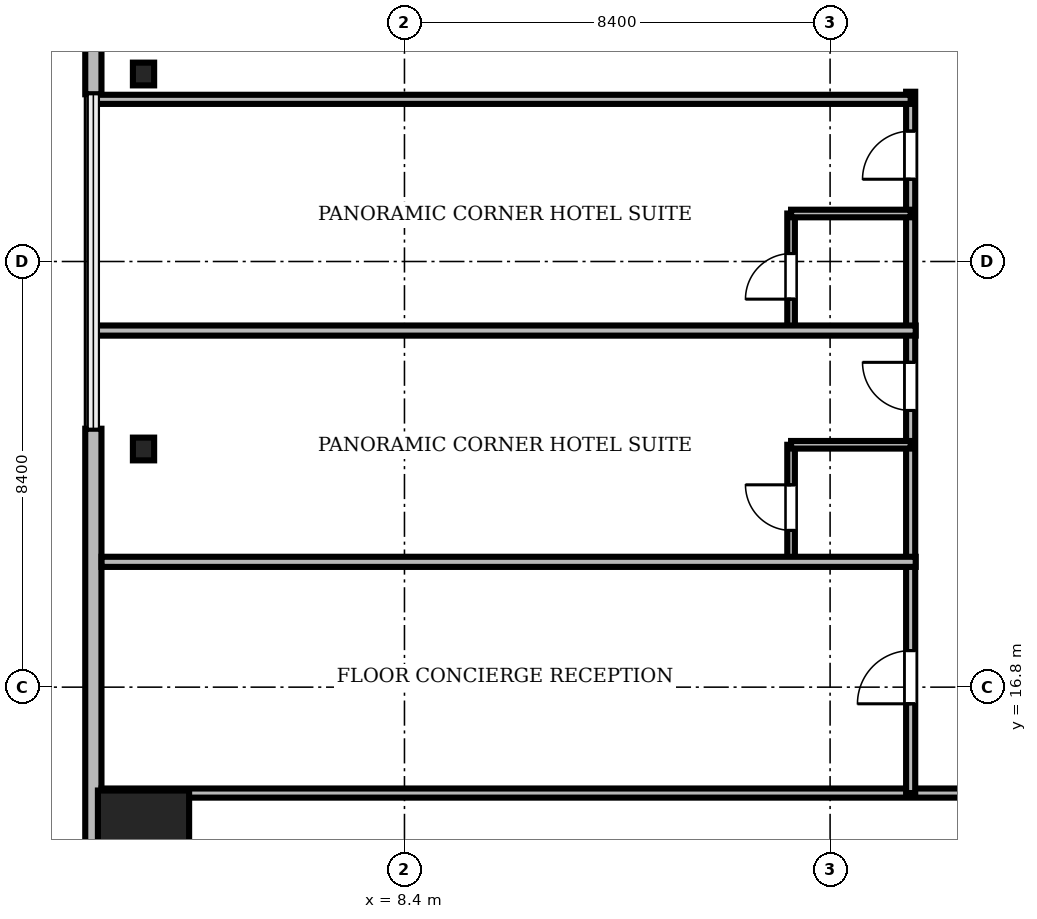
"""IFC4 building model, lengths in metres.
Left out: names, types, materials, properties, quantities, classifications, styles, units other than length and angle.
Written with IfcOpenShell. Run it as: python <this file> out.ifc"""

import sys

from ifc_helpers import new_model, si_unit, direction, frame, frame_2d, origin, origin_2d, place, context, subcontext, project, spatial, rectangle, i_section, extrude, source, transform, mapped, element, fill, save


model = new_model("IFC4")
c1 = context("Model", 3, precision=1e-05, world=origin(), true_north=direction((0.0, 1.0)))
c2 = subcontext(c1, "Body", "Model", "MODEL_VIEW")
j1 = project(units=[si_unit("LENGTHUNIT", "METRE"), si_unit("PLANEANGLEUNIT", "RADIAN")], contexts=[c1])
p1 = place(None, origin())
s1 = spatial("IfcSite", under=j1, at=p1, CompositionType="ELEMENT")
p2 = place(p1, origin())
s2 = spatial("IfcBuilding", under=s1, at=p2, CompositionType="ELEMENT")
p3 = place(p2, frame((0.0, 0.0, 42.2)))
s3 = spatial("IfcBuildingStorey", under=s2, at=p3, CompositionType="ELEMENT", Elevation=42.2)
m1 = source(origin(), c2, "Body", "SweptSolid", [
    extrude(rectangle(XDim=1.8, YDim=1.8, at=origin_2d()), origin(), (0.0, 0.0, 1.0), 3.41),
])
p4 = place(p3, frame((3.25, 13.86, 0.0), z_axis=(0.0, 0.0, 1.0), x_axis=(1.0, 0.0, 0.0)))
e1 = element("IfcColumn", 1, at=p4, inside=s3, PredefinedType="COLUMN", context=c2, shape_type="MappedRepresentation", body=[
    mapped(m1, transform((0.0, 0.0, 0.0), scale=1.0)),
])
m2 = source(origin(), c2, "Body", "SweptSolid", [
    extrude(i_section(OverallWidth=0.419, OverallDepth=0.449, WebThickness=0.031, FlangeThickness=0.048, FilletRadius=0.015, at=origin_2d()), origin(), (0.0, 0.0, 1.0), 3.41),
])
for number, where, z_axis, x_axis in (
    (2, (3.25, 28.9, 0.0), (0.0, 0.0, 1.0), (1.0, 0.0, 0.0)),
    (3, (3.25, 21.5, 0.0), (0.0, 0.0, 1.0), (1.0, 0.0, 0.0)),
):
    element("IfcColumn", number, at=place(p3, frame(where, z_axis=z_axis, x_axis=x_axis)), inside=s3, PredefinedType="COLUMN", context=c2, shape_type="MappedRepresentation", body=[
        mapped(m2, transform((0.0, 0.0, 0.0), scale=1.0)),
    ])
m3 = source(origin(), c2, "Body", "SweptSolid", [
    extrude(rectangle(XDim=15.6, YDim=0.32, at=frame_2d((7.8, 0.0))), origin(), (0.0, 0.0, 1.0), 3.41),
])
p5 = place(p3, frame((2.26, 44.1, 0.0), z_axis=(0.0, 0.0, 1.0), x_axis=(0.0, -1.0, 0.0)))
e4 = element("IfcWall", 4, at=p5, inside=s3, PredefinedType="SOLIDWALL", context=c2, shape_type="MappedRepresentation", body=[
    mapped(m3, transform((0.0, 0.0, 0.0), scale=1.0)),
])
m4 = source(origin(), c2, "Body", "SweptSolid", [
    extrude(rectangle(XDim=1.4, YDim=2.3, at=frame_2d((0.7, 1.15))), frame((0.0, 0.17, 0.0), z_axis=(0.0, -1.0, 0.0), x_axis=(1.0, 0.0, 0.0)), (0.0, 0.0, 1.0), 0.34),
])
p6 = place(p5, frame((9.61, 0.0, 0.0)))
e5 = element("IfcOpeningElement", 5, at=p6, cuts=e4, PredefinedType="OPENING", context=c2, shape_type="MappedRepresentation", body=[
    mapped(m4, transform((0.0, 0.0, 0.0), scale=1.0)),
])
m5 = source(origin(), c2, "Body", "SweptSolid", [
    extrude(rectangle(XDim=2.8, YDim=2.4, at=frame_2d((1.4, 1.2))), frame((0.0, 0.17, 0.0), z_axis=(0.0, -1.0, 0.0), x_axis=(1.0, 0.0, 0.0)), (0.0, 0.0, 1.0), 0.34),
])
p7 = place(p5, frame((2.705, 0.0, 0.72)))
e6 = element("IfcOpeningElement", 6, at=p7, cuts=e4, PredefinedType="OPENING", context=c2, shape_type="MappedRepresentation", body=[
    mapped(m5, transform((0.0, 0.0, 0.0), scale=1.0)),
])
m6 = source(origin(), c2, "Body", "SweptSolid", [
    extrude(rectangle(XDim=15.6, YDim=0.32, at=frame_2d((7.8, 0.0))), origin(), (0.0, 0.0, 1.0), 3.41),
])
p8 = place(p3, frame((2.26, 21.9, 0.0), z_axis=(0.0, 0.0, 1.0), x_axis=(0.0, -1.0, 0.0)))
e7 = element("IfcWall", 7, at=p8, inside=s3, PredefinedType="SOLIDWALL", context=c2, shape_type="MappedRepresentation", body=[
    mapped(m6, transform((0.0, 0.0, 0.0), scale=1.0)),
])
p9 = place(p8, frame((10.095, 0.0, 0.72)))
e8 = element("IfcOpeningElement", 8, at=p9, cuts=e7, PredefinedType="OPENING", context=c2, shape_type="MappedRepresentation", body=[
    mapped(m5, transform((0.0, 0.0, 0.0), scale=1.0)),
])
m7 = source(origin(), c2, "Body", "SweptSolid", [
    extrude(rectangle(XDim=46.156, YDim=0.18, at=frame_2d((23.078, 0.0))), origin(), (0.0, 0.0, 1.0), 2.652),
])
p10 = place(p3, frame((2.422, 14.71, 0.0), z_axis=(0.0, 0.0, 1.0), x_axis=(1.0, 0.0, 0.0)))
e9 = element("IfcWall", 9, at=p10, inside=s3, PredefinedType="PARTITIONING", context=c2, shape_type="MappedRepresentation", body=[
    mapped(m7, transform((0.0, 0.0, 0.0), scale=1.0)),
])
m8 = source(origin(), c2, "Body", "SweptSolid", [
    extrude(rectangle(XDim=1.05, YDim=2.2, at=frame_2d((0.525, 1.1))), frame((0.0, 0.1, 0.0), z_axis=(0.0, -1.0, 0.0), x_axis=(1.0, 0.0, 0.0)), (0.0, 0.0, 1.0), 0.2),
])
p11 = place(p10, frame((16.988, 0.0, 0.0)))
e10 = element("IfcOpeningElement", 10, at=p11, cuts=e9, PredefinedType="OPENING", context=c2, shape_type="MappedRepresentation", body=[
    mapped(m8, transform((0.0, 0.0, 0.0), scale=1.0)),
])
m9 = source(origin(), c2, "Body", "SweptSolid", [
    extrude(rectangle(XDim=0.95, YDim=2.15, at=frame_2d((0.475, 1.075))), frame((0.0, 0.1, 0.0), z_axis=(0.0, -1.0, 0.0), x_axis=(1.0, 0.0, 0.0)), (0.0, 0.0, 1.0), 0.2),
])
p12 = place(p10, frame((21.556, 0.0, 0.0)))
e11 = element("IfcOpeningElement", 11, at=p12, cuts=e9, PredefinedType="OPENING", context=c2, shape_type="MappedRepresentation", body=[
    mapped(m9, transform((0.0, 0.0, 0.0), scale=1.0)),
])
p13 = place(p10, frame((25.358, 0.0, 0.0)))
e12 = element("IfcOpeningElement", 12, at=p13, cuts=e9, PredefinedType="OPENING", context=c2, shape_type="MappedRepresentation", body=[
    mapped(m8, transform((0.0, 0.0, 0.0), scale=1.0)),
])
p14 = place(p10, frame((30.385, 0.0, 0.0)))
e13 = element("IfcOpeningElement", 13, at=p14, cuts=e9, PredefinedType="OPENING", context=c2, shape_type="MappedRepresentation", body=[
    mapped(m8, transform((0.0, 0.0, 0.0), scale=1.0)),
])
p15 = place(p10, frame((35.411, 0.0, 0.0)))
e14 = element("IfcOpeningElement", 14, at=p15, cuts=e9, PredefinedType="OPENING", context=c2, shape_type="MappedRepresentation", body=[
    mapped(m8, transform((0.0, 0.0, 0.0), scale=1.0)),
])
p16 = place(p10, frame((41.766, 0.0, 0.0)))
e15 = element("IfcOpeningElement", 15, at=p16, cuts=e9, PredefinedType="OPENING", context=c2, shape_type="MappedRepresentation", body=[
    mapped(m8, transform((0.0, 0.0, 0.0), scale=1.0)),
])
m10 = source(origin(), c2, "Body", "SweptSolid", [
    extrude(rectangle(XDim=13.84, YDim=0.18, at=frame_2d((6.92, 0.0))), origin(), (0.0, 0.0, 1.0), 2.802),
])
p17 = place(p3, frame((18.39, 14.71, 0.0), z_axis=(0.0, 0.0, 1.0), x_axis=(0.0, 1.0, 0.0)))
e16 = element("IfcWall", 16, at=p17, inside=s3, PredefinedType="PARTITIONING", context=c2, shape_type="MappedRepresentation", body=[
    mapped(m10, transform((0.0, 0.0, 0.0), scale=1.0)),
])
p18 = place(p17, frame((1.762, 0.0, 0.0)))
e17 = element("IfcOpeningElement", 17, at=p18, cuts=e16, PredefinedType="OPENING", context=c2, shape_type="MappedRepresentation", body=[
    mapped(m8, transform((0.0, 0.0, 0.0), scale=1.0)),
])
p19 = place(p17, frame((7.55, 0.0, 0.0)))
e18 = element("IfcOpeningElement", 18, at=p19, cuts=e16, PredefinedType="OPENING", context=c2, shape_type="MappedRepresentation", body=[
    mapped(m9, transform((0.0, 0.0, 0.0), scale=1.0)),
])
p20 = place(p17, frame((12.113, 0.0, 0.0)))
e19 = element("IfcOpeningElement", 19, at=p20, cuts=e16, PredefinedType="OPENING", context=c2, shape_type="MappedRepresentation", body=[
    mapped(m9, transform((0.0, 0.0, 0.0), scale=1.0)),
])
m11 = source(origin(), c2, "Body", "SweptSolid", [
    extrude(rectangle(XDim=2.29, YDim=0.15, at=frame_2d((1.145, 0.0))), origin(), (0.0, 0.0, 1.0), 2.802),
])
p21 = place(p3, frame((16.03, 19.293, 0.0), z_axis=(0.0, 0.0, 1.0), x_axis=(0.0, 1.0, 0.0)))
e20 = element("IfcWall", 20, at=p21, inside=s3, PredefinedType="PARTITIONING", context=c2, shape_type="MappedRepresentation", body=[
    mapped(m11, transform((0.0, 0.0, 0.0), scale=1.0)),
])
m12 = source(origin(), c2, "Body", "SweptSolid", [
    extrude(rectangle(XDim=0.9, YDim=2.1, at=frame_2d((0.45, 1.05))), frame((0.0, 0.085, 0.0), z_axis=(0.0, -1.0, 0.0), x_axis=(1.0, 0.0, 0.0)), (0.0, 0.0, 1.0), 0.17),
])
p22 = place(p21, frame((0.6, 0.0, 0.0)))
e21 = element("IfcOpeningElement", 21, at=p22, cuts=e20, PredefinedType="OPENING", context=c2, shape_type="MappedRepresentation", body=[
    mapped(m12, transform((0.0, 0.0, 0.0), scale=1.0)),
])
m13 = source(origin(), c2, "Body", "SweptSolid", [
    extrude(rectangle(XDim=2.29, YDim=0.15, at=frame_2d((1.145, 0.0))), origin(), (0.0, 0.0, 1.0), 3.41),
])
p23 = place(p3, frame((16.03, 23.857, 0.0), z_axis=(0.0, 0.0, 1.0), x_axis=(0.0, 1.0, 0.0)))
e22 = element("IfcWall", 22, at=p23, inside=s3, PredefinedType="PARTITIONING", context=c2, shape_type="MappedRepresentation", body=[
    mapped(m13, transform((0.0, 0.0, 0.0), scale=1.0)),
])
p24 = place(p23, frame((0.6, 0.0, 0.0)))
e23 = element("IfcOpeningElement", 23, at=p24, cuts=e22, PredefinedType="OPENING", context=c2, shape_type="MappedRepresentation", body=[
    mapped(m12, transform((0.0, 0.0, 0.0), scale=1.0)),
])
m14 = source(origin(), c2, "Body", "SweptSolid", [
    extrude(rectangle(XDim=16.068, YDim=0.2, at=frame_2d((8.034, 0.0))), origin(), (0.0, 0.0, 1.0), 2.652),
])
p25 = place(p3, frame((2.422, 19.273, 0.0), z_axis=(0.0, 0.0, 1.0), x_axis=(1.0, 0.0, 0.0)))
e24 = element("IfcWall", 24, at=p25, inside=s3, PredefinedType="PARTITIONING", context=c2, shape_type="MappedRepresentation", body=[
    mapped(m14, transform((0.0, 0.0, 0.0), scale=1.0)),
])
m15 = source(origin(), c2, "Body", "SweptSolid", [
    extrude(rectangle(XDim=16.26, YDim=0.2, at=frame_2d((8.13, 0.0))), origin(), (0.0, 0.0, 1.0), 2.652),
])
p26 = place(p3, frame((2.23, 23.837, 0.0), z_axis=(0.0, 0.0, 1.0), x_axis=(1.0, 0.0, 0.0)))
e25 = element("IfcWall", 25, at=p26, inside=s3, PredefinedType="PARTITIONING", context=c2, shape_type="MappedRepresentation", body=[
    mapped(m15, transform((0.0, 0.0, 0.0), scale=1.0)),
])
m16 = source(origin(), c2, "Body", "SweptSolid", [
    extrude(rectangle(XDim=16.16, YDim=0.18, at=frame_2d((8.08, 0.0))), origin(), (0.0, 0.0, 1.0), 2.652),
])
p27 = place(p3, frame((2.23, 28.4, 0.0), z_axis=(0.0, 0.0, 1.0), x_axis=(1.0, 0.0, 0.0)))
e26 = element("IfcWall", 26, at=p27, inside=s3, PredefinedType="PARTITIONING", context=c2, shape_type="MappedRepresentation", body=[
    mapped(m16, transform((0.0, 0.0, 0.0), scale=1.0)),
])
m17 = source(origin(), c2, "Body", "SweptSolid", [
    extrude(rectangle(XDim=2.36, YDim=0.15, at=frame_2d((1.18, 0.0))), origin(), (0.0, 0.0, 1.0), 3.41),
])
for number, where, z_axis, x_axis in (
    (27, (16.03, 21.583, 0.0), (0.0, 0.0, 1.0), (1.0, 0.0, 0.0)),
    (28, (16.03, 26.147, 0.0), (0.0, 0.0, 1.0), (1.0, 0.0, 0.0)),
):
    element("IfcWall", number, at=place(p3, frame(where, z_axis=z_axis, x_axis=x_axis)), inside=s3, PredefinedType="PARTITIONING", context=c2, shape_type="MappedRepresentation", body=[
        mapped(m17, transform((0.0, 0.0, 0.0), scale=1.0)),
    ])
m18 = source(origin(), c2, "Body", "SweptSolid", [
    extrude(rectangle(XDim=1.05, YDim=2.2, at=frame_2d((0.525, 1.1))), frame((0.0, 0.025, 0.0), z_axis=(0.0, -1.0, 0.0), x_axis=(1.0, 0.0, 0.0)), (0.0, 0.0, 1.0), 0.05),
])
p28 = place(p18, origin())
e29 = element("IfcDoor", 29, at=p28, inside=s3, OperationType="SINGLE_SWING_LEFT", PredefinedType="DOOR", context=c2, shape_type="MappedRepresentation", body=[
    mapped(m18, transform((0.0, 0.0, 0.0), scale=1.0)),
])
fill(e17, e29)
m19 = source(origin(), c2, "Body", "SweptSolid", [
    extrude(rectangle(XDim=0.95, YDim=2.15, at=frame_2d((0.475, 1.075))), frame((0.0, 0.025, 0.0), z_axis=(0.0, -1.0, 0.0), x_axis=(1.0, 0.0, 0.0)), (0.0, 0.0, 1.0), 0.05),
])
p29 = place(p19, origin())
e30 = element("IfcDoor", 30, at=p29, inside=s3, OperationType="SINGLE_SWING_RIGHT", PredefinedType="DOOR", context=c2, shape_type="MappedRepresentation", body=[
    mapped(m19, transform((0.0, 0.0, 0.0), scale=1.0)),
])
fill(e18, e30)
p30 = place(p20, origin())
e31 = element("IfcDoor", 31, at=p30, inside=s3, OperationType="SINGLE_SWING_LEFT", PredefinedType="DOOR", context=c2, shape_type="MappedRepresentation", body=[
    mapped(m19, transform((0.0, 0.0, 0.0), scale=1.0)),
])
fill(e19, e31)
m20 = source(origin(), c2, "Body", "SweptSolid", [
    extrude(rectangle(XDim=0.9, YDim=2.1, at=frame_2d((0.45, 1.05))), frame((0.0, 0.025, 0.0), z_axis=(0.0, -1.0, 0.0), x_axis=(1.0, 0.0, 0.0)), (0.0, 0.0, 1.0), 0.05),
])
p31 = place(p22, origin())
e32 = element("IfcDoor", 32, at=p31, inside=s3, OperationType="SINGLE_SWING_RIGHT", PredefinedType="DOOR", context=c2, shape_type="MappedRepresentation", body=[
    mapped(m20, transform((0.0, 0.0, 0.0), scale=1.0)),
])
fill(e21, e32)
p32 = place(p24, origin())
e33 = element("IfcDoor", 33, at=p32, inside=s3, OperationType="SINGLE_SWING_LEFT", PredefinedType="DOOR", context=c2, shape_type="MappedRepresentation", body=[
    mapped(m20, transform((0.0, 0.0, 0.0), scale=1.0)),
])
fill(e23, e33)
save(model, sys.argv[1])
